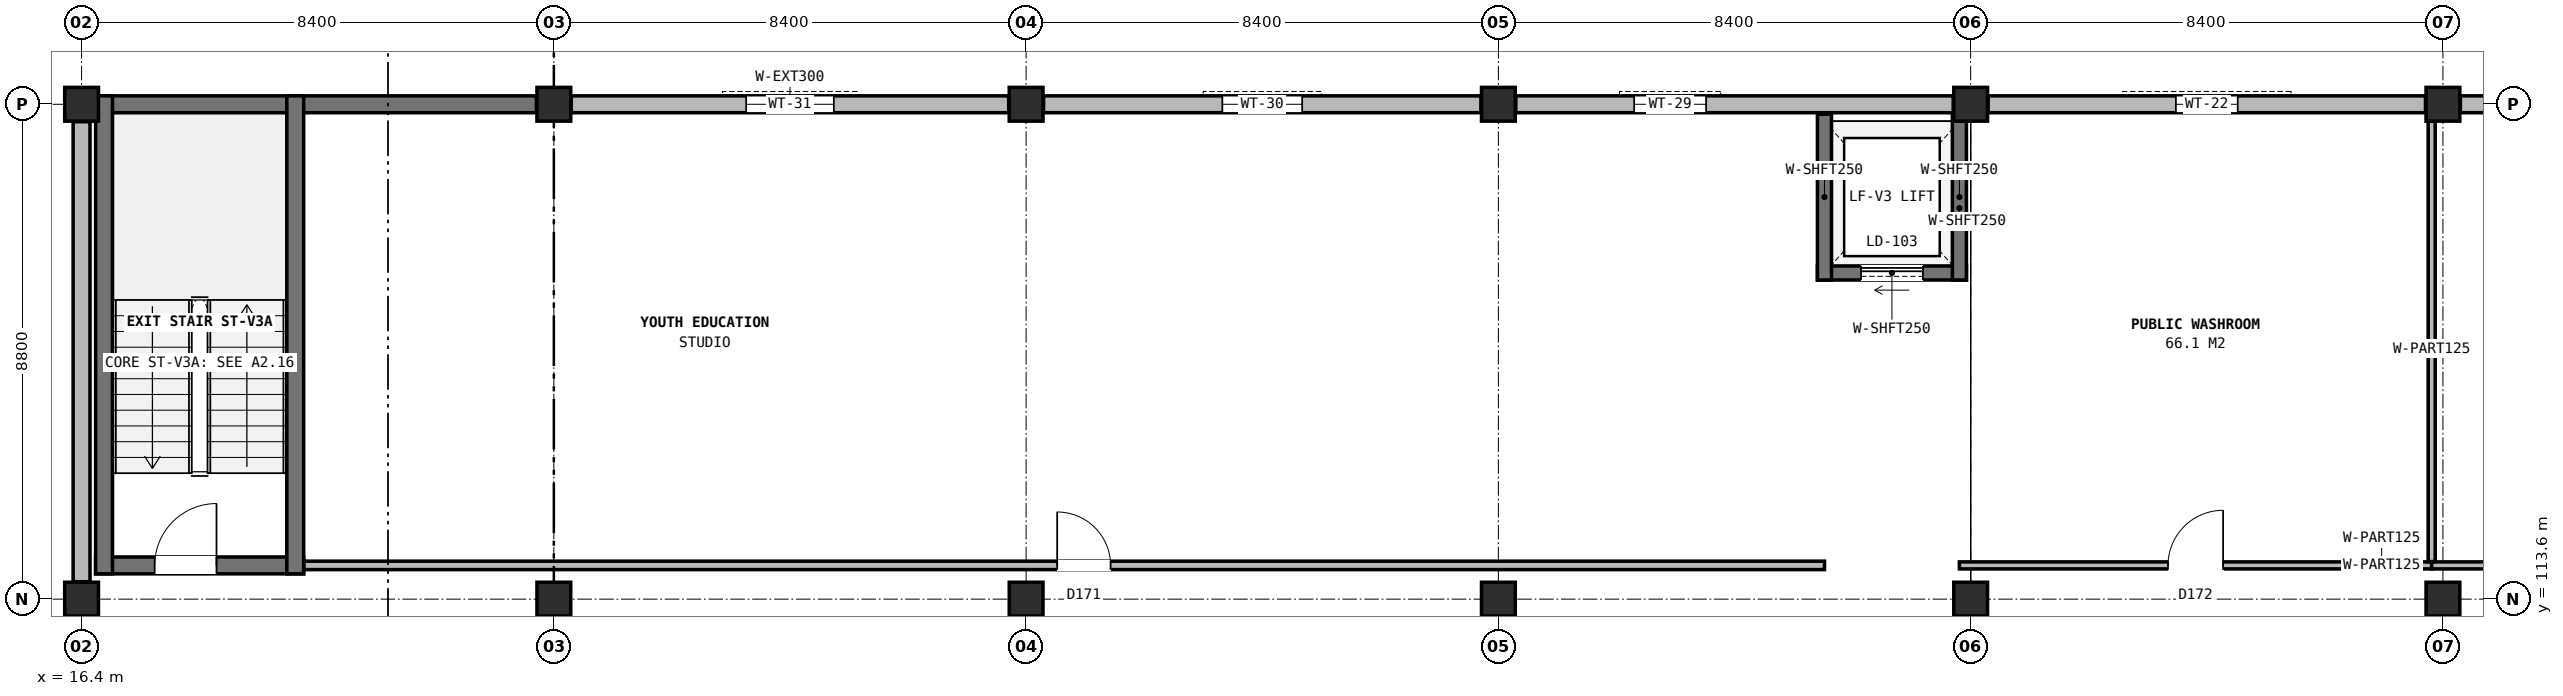
"""IFC4 building model, lengths in metres.
Left out: names, types, materials, properties, quantities, classifications, styles, units other than length and angle.
Written with IfcOpenShell. Run it as: python <this file> out.ifc"""

import sys

from ifc_helpers import new_model, si_unit, direction, frame, frame_2d, origin, origin_2d, place, context, subcontext, project, spatial, rectangle, extrude, element, fill, save


model = new_model("IFC4")
c1 = context("Model", 3, precision=1e-05, world=origin(), true_north=direction((0.0, 1.0)))
c2 = subcontext(c1, "Body", "Model", "MODEL_VIEW")
j1 = project(units=[si_unit("LENGTHUNIT", "METRE"), si_unit("PLANEANGLEUNIT", "RADIAN")], contexts=[c1])
p1 = place(None, origin())
s1 = spatial("IfcSite", under=j1, at=p1, CompositionType="ELEMENT")
p2 = place(p1, origin())
s2 = spatial("IfcBuilding", under=s1, at=p2, CompositionType="ELEMENT")
p3 = place(p2, frame((0.0, 0.0, 9.0)))
s3 = spatial("IfcBuildingStorey", under=s2, at=p3, CompositionType="ELEMENT", Elevation=9.0)
for number, where, z_axis, x_axis in (
    (1, (16.4, 113.6, 0.0), (0.0, 0.0, 1.0), (1.0, 0.0, 0.0)),
    (2, (16.4, 122.4, 0.0), (0.0, 0.0, 1.0), (1.0, 0.0, 0.0)),
    (3, (24.8, 113.6, 0.0), (0.0, 0.0, 1.0), (1.0, 0.0, 0.0)),
    (4, (24.8, 122.4, 0.0), (0.0, 0.0, 1.0), (1.0, 0.0, 0.0)),
    (5, (33.2, 113.6, 0.0), (0.0, 0.0, 1.0), (1.0, 0.0, 0.0)),
    (6, (33.2, 122.4, 0.0), (0.0, 0.0, 1.0), (1.0, 0.0, 0.0)),
    (7, (41.6, 113.6, 0.0), (0.0, 0.0, 1.0), (1.0, 0.0, 0.0)),
    (8, (41.6, 122.4, 0.0), (0.0, 0.0, 1.0), (1.0, 0.0, 0.0)),
    (9, (50.0, 113.6, 0.0), (0.0, 0.0, 1.0), (1.0, 0.0, 0.0)),
    (10, (50.0, 122.4, 0.0), (0.0, 0.0, 1.0), (1.0, 0.0, 0.0)),
    (11, (58.4, 113.6, 0.0), (0.0, 0.0, 1.0), (1.0, 0.0, 0.0)),
    (12, (58.4, 122.4, 0.0), (0.0, 0.0, 1.0), (1.0, 0.0, 0.0)),
):
    element("IfcColumn", number, at=place(p3, frame(where, z_axis=z_axis, x_axis=x_axis)), inside=s3, PredefinedType="COLUMN", context=c2, shape_type="SweptSolid", body=[
        extrude(rectangle(XDim=0.6, YDim=0.6, at=origin_2d()), origin(), (0.0, 0.0, 1.0), 4.2),
    ])
p4 = place(p3, frame((66.49, 122.4, 0.0), z_axis=(0.0, 0.0, 1.0), x_axis=(-1.0, 0.0, 0.0)))
e13 = element("IfcWall", 13, at=p4, inside=s3, PredefinedType="SOLIDWALL", context=c2, shape_type="SweptSolid", body=[
    extrude(rectangle(XDim=7.78, YDim=0.3, at=frame_2d((3.89, 0.0))), origin(), (0.0, 0.0, 1.0), 3.45),
])
p5 = place(p4, frame((3.415, 0.0, 0.9)))
e14 = element("IfcOpeningElement", 14, at=p5, cuts=e13, PredefinedType="OPENING", context=c2, shape_type="SweptSolid", body=[
    extrude(rectangle(XDim=0.95, YDim=1.6, at=frame_2d((0.475, 0.8))), frame((0.0, 0.16, 0.0), z_axis=(0.0, -1.0, 0.0), x_axis=(1.0, 0.0, 0.0)), (0.0, 0.0, 1.0), 0.32),
])
p6 = place(p3, frame((58.09, 122.4, 0.0), z_axis=(0.0, 0.0, 1.0), x_axis=(-1.0, 0.0, 0.0)))
e15 = element("IfcWall", 15, at=p6, inside=s3, PredefinedType="SOLIDWALL", context=c2, shape_type="SweptSolid", body=[
    extrude(rectangle(XDim=7.78, YDim=0.3, at=frame_2d((3.89, 0.0))), origin(), (0.0, 0.0, 1.0), 3.45),
])
p7 = place(p6, frame((3.34, 0.0, 0.9)))
e16 = element("IfcOpeningElement", 16, at=p7, cuts=e15, PredefinedType="OPENING", context=c2, shape_type="SweptSolid", body=[
    extrude(rectangle(XDim=1.1, YDim=1.65, at=frame_2d((0.55, 0.825))), frame((0.0, 0.16, 0.0), z_axis=(0.0, -1.0, 0.0), x_axis=(1.0, 0.0, 0.0)), (0.0, 0.0, 1.0), 0.32),
])
p8 = place(p3, frame((49.69, 122.4, 0.0), z_axis=(0.0, 0.0, 1.0), x_axis=(-1.0, 0.0, 0.0)))
e17 = element("IfcWall", 17, at=p8, inside=s3, PredefinedType="SOLIDWALL", context=c2, shape_type="SweptSolid", body=[
    extrude(rectangle(XDim=7.78, YDim=0.3, at=frame_2d((3.89, 0.0))), origin(), (0.0, 0.0, 1.0), 3.45),
])
p9 = place(p8, frame((4.395, 0.0, 0.9)))
e18 = element("IfcOpeningElement", 18, at=p9, cuts=e17, PredefinedType="OPENING", context=c2, shape_type="SweptSolid", body=[
    extrude(rectangle(XDim=1.28, YDim=1.82, at=frame_2d((0.64, 0.91))), frame((0.0, 0.16, 0.0), z_axis=(0.0, -1.0, 0.0), x_axis=(1.0, 0.0, 0.0)), (0.0, 0.0, 1.0), 0.32),
])
p10 = place(p3, frame((41.29, 122.4, 0.0), z_axis=(0.0, 0.0, 1.0), x_axis=(-1.0, 0.0, 0.0)))
e19 = element("IfcWall", 19, at=p10, inside=s3, PredefinedType="SOLIDWALL", context=c2, shape_type="SweptSolid", body=[
    extrude(rectangle(XDim=7.78, YDim=0.3, at=frame_2d((3.89, 0.0))), origin(), (0.0, 0.0, 1.0), 3.45),
])
p11 = place(p10, frame((3.18, 0.0, 0.9)))
e20 = element("IfcOpeningElement", 20, at=p11, cuts=e19, PredefinedType="OPENING", context=c2, shape_type="SweptSolid", body=[
    extrude(rectangle(XDim=1.42, YDim=1.86, at=frame_2d((0.71, 0.93))), frame((0.0, 0.16, 0.0), z_axis=(0.0, -1.0, 0.0), x_axis=(1.0, 0.0, 0.0)), (0.0, 0.0, 1.0), 0.32),
])
p12 = place(p3, frame((32.89, 122.4, 0.0), z_axis=(0.0, 0.0, 1.0), x_axis=(-1.0, 0.0, 0.0)))
e21 = element("IfcWall", 21, at=p12, inside=s3, PredefinedType="SOLIDWALL", context=c2, shape_type="SweptSolid", body=[
    extrude(rectangle(XDim=7.78, YDim=0.3, at=frame_2d((3.89, 0.0))), origin(), (0.0, 0.0, 1.0), 3.45),
])
p13 = place(p12, frame((3.11, 0.0, 0.9)))
e22 = element("IfcOpeningElement", 22, at=p13, cuts=e21, PredefinedType="OPENING", context=c2, shape_type="SweptSolid", body=[
    extrude(rectangle(XDim=1.56, YDim=1.88, at=frame_2d((0.78, 0.94))), frame((0.0, 0.16, 0.0), z_axis=(0.0, -1.0, 0.0), x_axis=(1.0, 0.0, 0.0)), (0.0, 0.0, 1.0), 0.32),
])
p14 = place(p3, frame((24.49, 122.4, 0.0), z_axis=(0.0, 0.0, 1.0), x_axis=(-1.0, 0.0, 0.0)))
e23 = element("IfcWall", 23, at=p14, inside=s3, PredefinedType="SHEAR", context=c2, shape_type="SweptSolid", body=[
    extrude(rectangle(XDim=7.78, YDim=0.3, at=frame_2d((3.89, 0.0))), origin(), (0.0, 0.0, 1.0), 3.45),
])
p15 = place(p3, frame((16.4, 122.09, 0.0), z_axis=(0.0, 0.0, 1.0), x_axis=(0.0, -1.0, 0.0)))
e24 = element("IfcWall", 24, at=p15, inside=s3, PredefinedType="SOLIDWALL", context=c2, shape_type="SweptSolid", body=[
    extrude(rectangle(XDim=8.18, YDim=0.3, at=frame_2d((4.09, 0.0))), origin(), (0.0, 0.0, 1.0), 3.45),
])
p16 = place(p3, frame((16.4, 113.29, 0.0), z_axis=(0.0, 0.0, 1.0), x_axis=(0.0, -1.0, 0.0)))
e25 = element("IfcWall", 25, at=p16, inside=s3, PredefinedType="SOLIDWALL", context=c2, shape_type="SweptSolid", body=[
    extrude(rectangle(XDim=8.18, YDim=0.3, at=frame_2d((4.09, 0.0))), origin(), (0.0, 0.0, 1.0), 3.45),
])
p17 = place(p16, frame((4.215, 0.0, 0.9)))
e26 = element("IfcOpeningElement", 26, at=p17, cuts=e25, PredefinedType="OPENING", context=c2, shape_type="SweptSolid", body=[
    extrude(rectangle(XDim=2.04, YDim=1.98, at=frame_2d((1.02, 0.99))), frame((0.0, 0.16, 0.0), z_axis=(0.0, -1.0, 0.0), x_axis=(1.0, 0.0, 0.0)), (0.0, 0.0, 1.0), 0.32),
])
p18 = place(p3, frame((16.65, 114.2, 0.0), z_axis=(0.0, 0.0, 1.0), x_axis=(1.0, 0.0, 0.0)))
e27 = element("IfcWall", 27, at=p18, inside=s3, PredefinedType="SHEAR", context=c2, shape_type="SweptSolid", body=[
    extrude(rectangle(XDim=3.7, YDim=0.3, at=frame_2d((1.85, 0.0))), origin(), (0.0, 0.0, 1.0), 4.2),
])
p19 = place(p18, frame((1.05, 0.0, 0.0)))
e28 = element("IfcOpeningElement", 28, at=p19, cuts=e27, PredefinedType="OPENING", context=c2, shape_type="SweptSolid", body=[
    extrude(rectangle(XDim=1.1, YDim=2.2, at=frame_2d((0.55, 1.1))), frame((0.0, 0.16, 0.0), z_axis=(0.0, -1.0, 0.0), x_axis=(1.0, 0.0, 0.0)), (0.0, 0.0, 1.0), 0.32),
])
for number, where, z_axis, x_axis in (
    (29, (16.8, 114.05, 0.0), (0.0, 0.0, 1.0), (0.0, 1.0, 0.0)),
    (30, (20.2, 114.05, 0.0), (0.0, 0.0, 1.0), (0.0, 1.0, 0.0)),
):
    element("IfcWall", number, at=place(p3, frame(where, z_axis=z_axis, x_axis=x_axis)), inside=s3, PredefinedType="SHEAR", context=c2, shape_type="SweptSolid", body=[
        extrude(rectangle(XDim=8.5, YDim=0.3, at=frame_2d((4.25, 0.0))), origin(), (0.0, 0.0, 1.0), 4.2),
    ])
p20 = place(p3, frame((47.275, 119.4, 0.0), z_axis=(0.0, 0.0, 1.0), x_axis=(1.0, 0.0, 0.0)))
e31 = element("IfcWall", 31, at=p20, inside=s3, PredefinedType="SOLIDWALL", context=c2, shape_type="SweptSolid", body=[
    extrude(rectangle(XDim=2.65, YDim=0.25, at=frame_2d((1.325, 0.0))), origin(), (0.0, 0.0, 1.0), 3.88),
])
p21 = place(p20, frame((0.775, 0.0, 0.0)))
e32 = element("IfcOpeningElement", 32, at=p21, cuts=e31, PredefinedType="OPENING", context=c2, shape_type="SweptSolid", body=[
    extrude(rectangle(XDim=1.1, YDim=2.2, at=frame_2d((0.55, 1.1))), frame((0.0, 0.135, 0.0), z_axis=(0.0, -1.0, 0.0), x_axis=(1.0, 0.0, 0.0)), (0.0, 0.0, 1.0), 0.27),
])
for number, where, z_axis, x_axis in (
    (33, (47.4, 119.275, 0.0), (0.0, 0.0, 1.0), (0.0, 1.0, 0.0)),
    (34, (49.8, 119.275, 0.0), (0.0, 0.0, 1.0), (0.0, 1.0, 0.0)),
):
    element("IfcWall", number, at=place(p3, frame(where, z_axis=z_axis, x_axis=x_axis)), inside=s3, PredefinedType="SOLIDWALL", context=c2, shape_type="SweptSolid", body=[
        extrude(rectangle(XDim=2.95, YDim=0.25, at=frame_2d((1.475, 0.0))), origin(), (0.0, 0.0, 1.0), 3.88),
    ])
p22 = place(p3, frame((20.355, 114.2, 0.0), z_axis=(0.0, 0.0, 1.0), x_axis=(1.0, 0.0, 0.0)))
e35 = element("IfcWall", 35, at=p22, inside=s3, PredefinedType="PARTITIONING", context=c2, shape_type="SweptSolid", body=[
    extrude(rectangle(XDim=27.045, YDim=0.15, at=frame_2d((13.522, 0.0))), origin(), (0.0, 0.0, 1.0), 3.865),
])
p23 = place(p22, frame((13.397, 0.0, 0.0)))
e36 = element("IfcOpeningElement", 36, at=p23, cuts=e35, PredefinedType="OPENING", context=c2, shape_type="SweptSolid", body=[
    extrude(rectangle(XDim=0.95, YDim=2.18, at=frame_2d((0.475, 1.09))), frame((0.0, 0.085, 0.0), z_axis=(0.0, -1.0, 0.0), x_axis=(1.0, 0.0, 0.0)), (0.0, 0.0, 1.0), 0.17),
])
p24 = place(p3, frame((49.8, 114.2, 0.0), z_axis=(0.0, 0.0, 1.0), x_axis=(1.0, 0.0, 0.0)))
e37 = element("IfcWall", 37, at=p24, inside=s3, PredefinedType="PARTITIONING", context=c2, shape_type="SweptSolid", body=[
    extrude(rectangle(XDim=8.4, YDim=0.125, at=frame_2d((4.2, 0.0))), origin(), (0.0, 0.0, 1.0), 3.865),
])
p25 = place(p24, frame((3.71, 0.0, 0.0)))
e38 = element("IfcOpeningElement", 38, at=p25, cuts=e37, PredefinedType="OPENING", context=c2, shape_type="SweptSolid", body=[
    extrude(rectangle(XDim=0.98, YDim=2.1, at=frame_2d((0.49, 1.05))), frame((0.0, 0.073, 0.0), z_axis=(0.0, -1.0, 0.0), x_axis=(1.0, 0.0, 0.0)), (0.0, 0.0, 1.0), 0.145),
])
p26 = place(p3, frame((58.2, 114.2, 0.0), z_axis=(0.0, 0.0, 1.0), x_axis=(1.0, 0.0, 0.0)))
e39 = element("IfcWall", 39, at=p26, inside=s3, PredefinedType="PARTITIONING", context=c2, shape_type="SweptSolid", body=[
    extrude(rectangle(XDim=8.4, YDim=0.125, at=frame_2d((4.2, 0.0))), origin(), (0.0, 0.0, 1.0), 3.865),
])
p27 = place(p26, frame((3.71, 0.0, 0.0)))
e40 = element("IfcOpeningElement", 40, at=p27, cuts=e39, PredefinedType="OPENING", context=c2, shape_type="SweptSolid", body=[
    extrude(rectangle(XDim=0.98, YDim=2.1, at=frame_2d((0.49, 1.05))), frame((0.0, 0.073, 0.0), z_axis=(0.0, -1.0, 0.0), x_axis=(1.0, 0.0, 0.0)), (0.0, 0.0, 1.0), 0.145),
])
p28 = place(p3, frame((58.2, 114.268, 0.0), z_axis=(0.0, 0.0, 1.0), x_axis=(0.0, 1.0, 0.0)))
e41 = element("IfcWall", 41, at=p28, inside=s3, PredefinedType="PARTITIONING", context=c2, shape_type="SweptSolid", body=[
    extrude(rectangle(XDim=7.833, YDim=0.125, at=frame_2d((3.916, 0.0))), origin(), (0.0, 0.0, 1.0), 3.445),
])
p29 = place(p7, origin())
e42 = element("IfcWindow", 42, at=p29, inside=s3, PartitioningType="SINGLE_PANEL", PredefinedType="WINDOW", context=c2, shape_type="SweptSolid", body=[
    extrude(rectangle(XDim=1.1, YDim=1.65, at=frame_2d((0.55, 0.825))), frame((0.0, 0.03, 0.0), z_axis=(0.0, -1.0, 0.0), x_axis=(1.0, 0.0, 0.0)), (0.0, 0.0, 1.0), 0.06),
])
fill(e16, e42)
p30 = place(p9, origin())
e43 = element("IfcWindow", 43, at=p30, inside=s3, PartitioningType="SINGLE_PANEL", PredefinedType="WINDOW", context=c2, shape_type="SweptSolid", body=[
    extrude(rectangle(XDim=1.28, YDim=1.82, at=frame_2d((0.64, 0.91))), frame((0.0, 0.03, 0.0), z_axis=(0.0, -1.0, 0.0), x_axis=(1.0, 0.0, 0.0)), (0.0, 0.0, 1.0), 0.06),
])
fill(e18, e43)
p31 = place(p11, origin())
e44 = element("IfcWindow", 44, at=p31, inside=s3, PartitioningType="SINGLE_PANEL", PredefinedType="WINDOW", context=c2, shape_type="SweptSolid", body=[
    extrude(rectangle(XDim=1.42, YDim=1.86, at=frame_2d((0.71, 0.93))), frame((0.0, 0.03, 0.0), z_axis=(0.0, -1.0, 0.0), x_axis=(1.0, 0.0, 0.0)), (0.0, 0.0, 1.0), 0.06),
])
fill(e20, e44)
p32 = place(p13, origin())
e45 = element("IfcWindow", 45, at=p32, inside=s3, PartitioningType="SINGLE_PANEL", PredefinedType="WINDOW", context=c2, shape_type="SweptSolid", body=[
    extrude(rectangle(XDim=1.56, YDim=1.88, at=frame_2d((0.78, 0.94))), frame((0.0, 0.03, 0.0), z_axis=(0.0, -1.0, 0.0), x_axis=(1.0, 0.0, 0.0)), (0.0, 0.0, 1.0), 0.06),
])
fill(e22, e45)
p33 = place(p19, origin())
e46 = element("IfcDoor", 46, at=p33, inside=s3, OperationType="SINGLE_SWING_RIGHT", PredefinedType="DOOR", context=c2, shape_type="SweptSolid", body=[
    extrude(rectangle(XDim=1.1, YDim=2.2, at=frame_2d((0.55, 1.1))), frame((0.0, 0.025, 0.0), z_axis=(0.0, -1.0, 0.0), x_axis=(1.0, 0.0, 0.0)), (0.0, 0.0, 1.0), 0.05),
])
fill(e28, e46)
p34 = place(p21, origin())
e47 = element("IfcDoor", 47, at=p34, inside=s3, OperationType="SLIDING_TO_LEFT", PredefinedType="DOOR", context=c2, shape_type="SweptSolid", body=[
    extrude(rectangle(XDim=1.1, YDim=2.2, at=frame_2d((0.55, 1.1))), frame((0.0, 0.025, 0.0), z_axis=(0.0, -1.0, 0.0), x_axis=(1.0, 0.0, 0.0)), (0.0, 0.0, 1.0), 0.05),
])
fill(e32, e47)
p35 = place(p23, origin())
e48 = element("IfcDoor", 48, at=p35, inside=s3, OperationType="SINGLE_SWING_LEFT", PredefinedType="DOOR", context=c2, shape_type="SweptSolid", body=[
    extrude(rectangle(XDim=0.95, YDim=2.18, at=frame_2d((0.475, 1.09))), frame((0.0, 0.025, 0.0), z_axis=(0.0, -1.0, 0.0), x_axis=(1.0, 0.0, 0.0)), (0.0, 0.0, 1.0), 0.05),
])
fill(e36, e48)
p36 = place(p25, origin())
e49 = element("IfcDoor", 49, at=p36, inside=s3, OperationType="SINGLE_SWING_RIGHT", PredefinedType="DOOR", context=c2, shape_type="SweptSolid", body=[
    extrude(rectangle(XDim=0.98, YDim=2.1, at=frame_2d((0.49, 1.05))), frame((0.0, 0.025, 0.0), z_axis=(0.0, -1.0, 0.0), x_axis=(1.0, 0.0, 0.0)), (0.0, 0.0, 1.0), 0.05),
])
fill(e38, e49)
save(model, sys.argv[1])
